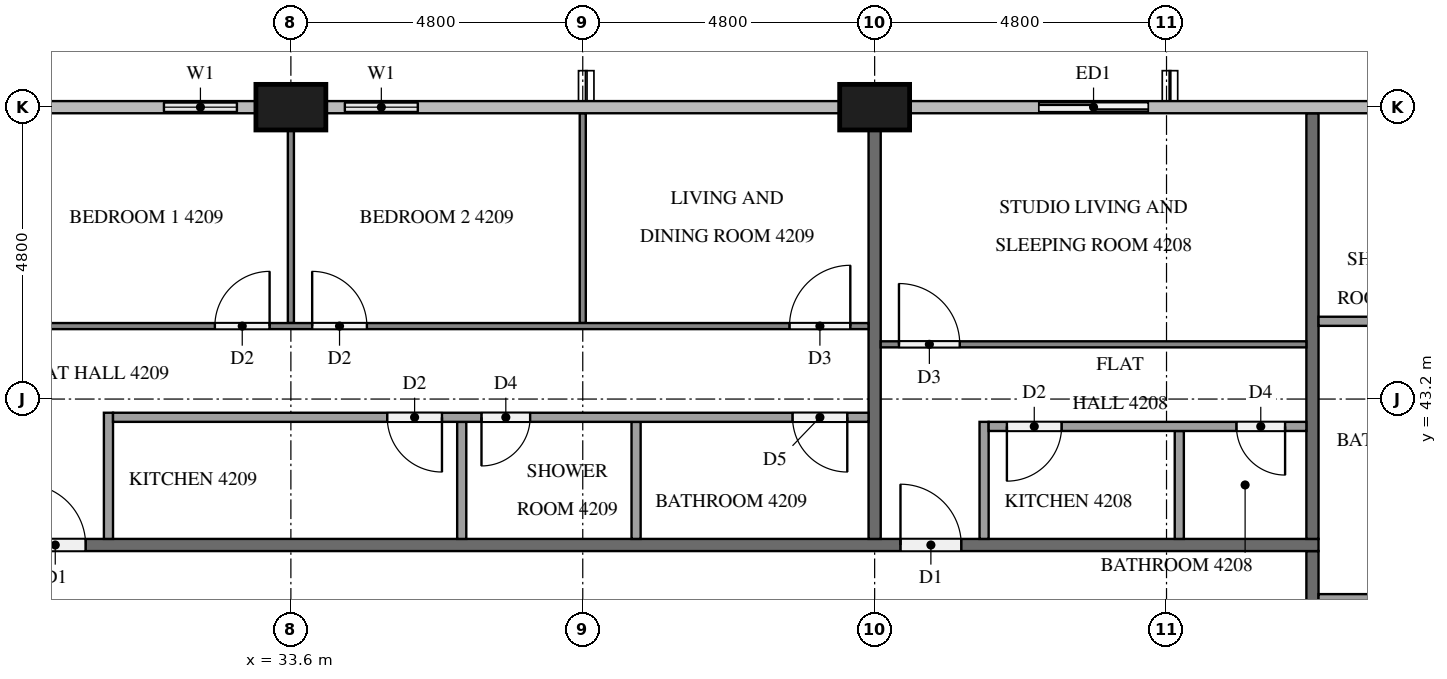
"""IFC4 building model, lengths in metres.
Left out: names, types, materials, properties, quantities, classifications, styles, units other than length and angle.
Written with IfcOpenShell. Run it as: python <this file> out.ifc"""

import sys

from ifc_helpers import new_model, si_unit, direction, frame, frame_2d, origin, origin_2d, place, context, subcontext, project, spatial, rectangle, extrude, element, fill, save


model = new_model("IFC4")
c1 = context("Model", 3, precision=1e-05, world=origin(), true_north=direction((0.0, 1.0)))
c2 = subcontext(c1, "Body", "Model", "MODEL_VIEW")
j1 = project(units=[si_unit("LENGTHUNIT", "METRE"), si_unit("PLANEANGLEUNIT", "RADIAN")], contexts=[c1])
p1 = place(None, origin())
s1 = spatial("IfcSite", under=j1, at=p1, CompositionType="ELEMENT")
p2 = place(p1, origin())
s2 = spatial("IfcBuilding", under=s1, at=p2, CompositionType="ELEMENT")
p3 = place(p2, frame((0.0, 0.0, 163.0)))
s3 = spatial("IfcBuildingStorey", under=s2, at=p3, CompositionType="ELEMENT", Elevation=163.0)
for number, where, z_axis, x_axis in (
    (1, (43.2, 48.0, 0.0), (0.0, 0.0, 1.0), (1.0, 0.0, 0.0)),
    (2, (33.6, 48.0, 0.0), (0.0, 0.0, 1.0), (1.0, 0.0, 0.0)),
):
    element("IfcColumn", number, at=place(p3, frame(where, z_axis=z_axis, x_axis=x_axis)), inside=s3, PredefinedType="COLUMN", context=c2, shape_type="SweptSolid", body=[
        extrude(rectangle(XDim=1.15, YDim=0.75, at=origin_2d()), origin(), (0.0, 0.0, 1.0), 3.2),
    ])
p4 = place(p3, frame((48.0, 48.0, 0.0), z_axis=(0.0, 0.0, 1.0), x_axis=(-1.0, 0.0, 0.0)))
e3 = element("IfcWall", 3, at=p4, inside=s3, PredefinedType="SOLIDWALL", context=c2, shape_type="SweptSolid", body=[
    extrude(rectangle(XDim=2.4, YDim=0.15, at=frame_2d((1.2, 0.0))), origin(), (0.0, 0.0, 1.0), 3.2),
])
p5 = place(p4, frame((0.3, 0.0, 0.0)))
e4 = element("IfcOpeningElement", 4, at=p5, cuts=e3, PredefinedType="OPENING", context=c2, shape_type="SweptSolid", body=[
    extrude(rectangle(XDim=1.8, YDim=2.4, at=frame_2d((0.9, 1.2))), frame((0.0, 0.085, 0.0), z_axis=(0.0, -1.0, 0.0), x_axis=(1.0, 0.0, 0.0)), (0.0, 0.0, 1.0), 0.17),
])
p6 = place(p3, frame((36.0, 48.0, 0.0), z_axis=(0.0, 0.0, 1.0), x_axis=(-1.0, 0.0, 0.0)))
e5 = element("IfcWall", 5, at=p6, inside=s3, PredefinedType="SOLIDWALL", context=c2, shape_type="SweptSolid", body=[
    extrude(rectangle(XDim=1.825, YDim=0.15, at=frame_2d((0.913, 0.0))), origin(), (0.0, 0.0, 1.0), 3.2),
])
p7 = place(p6, frame((0.312, 0.0, 0.9)))
e6 = element("IfcOpeningElement", 6, at=p7, cuts=e5, PredefinedType="OPENING", context=c2, shape_type="SweptSolid", body=[
    extrude(rectangle(XDim=1.2, YDim=1.4, at=frame_2d((0.6, 0.7))), frame((0.0, 0.085, 0.0), z_axis=(0.0, -1.0, 0.0), x_axis=(1.0, 0.0, 0.0)), (0.0, 0.0, 1.0), 0.17),
])
p8 = place(p3, frame((33.025, 48.0, 0.0), z_axis=(0.0, 0.0, 1.0), x_axis=(-1.0, 0.0, 0.0)))
e7 = element("IfcWall", 7, at=p8, inside=s3, PredefinedType="SOLIDWALL", context=c2, shape_type="SweptSolid", body=[
    extrude(rectangle(XDim=1.825, YDim=0.15, at=frame_2d((0.913, 0.0))), origin(), (0.0, 0.0, 1.0), 3.2),
])
p9 = place(p8, frame((0.312, 0.0, 0.9)))
e8 = element("IfcOpeningElement", 8, at=p9, cuts=e7, PredefinedType="OPENING", context=c2, shape_type="SweptSolid", body=[
    extrude(rectangle(XDim=1.2, YDim=1.4, at=frame_2d((0.6, 0.7))), frame((0.0, 0.085, 0.0), z_axis=(0.0, -1.0, 0.0), x_axis=(1.0, 0.0, 0.0)), (0.0, 0.0, 1.0), 0.17),
])
p10 = place(p3, frame((50.4, 40.7, 0.0), z_axis=(0.0, 0.0, 1.0), x_axis=(0.0, -1.0, 0.0)))
e9 = element("IfcWall", 9, at=p10, inside=s3, PredefinedType="PARTITIONING", context=c2, shape_type="SweptSolid", body=[
    extrude(rectangle(XDim=28.6, YDim=0.2, at=frame_2d((14.3, 0.0))), origin(), (0.0, 0.0, 1.0), 3.2),
])
p11 = place(p10, frame((19.525, 0.0, 0.0)))
e10 = element("IfcOpeningElement", 10, at=p11, cuts=e9, PredefinedType="OPENING", context=c2, shape_type="SweptSolid", body=[
    extrude(rectangle(XDim=1.0, YDim=2.1, at=frame_2d((0.5, 1.05))), frame((0.0, 0.11, 0.0), z_axis=(0.0, -1.0, 0.0), x_axis=(1.0, 0.0, 0.0)), (0.0, 0.0, 1.0), 0.22),
])
p12 = place(p10, frame((17.675, 0.0, 0.0)))
e11 = element("IfcOpeningElement", 11, at=p12, cuts=e9, PredefinedType="OPENING", context=c2, shape_type="SweptSolid", body=[
    extrude(rectangle(XDim=1.0, YDim=2.1, at=frame_2d((0.5, 1.05))), frame((0.0, 0.11, 0.0), z_axis=(0.0, -1.0, 0.0), x_axis=(1.0, 0.0, 0.0)), (0.0, 0.0, 1.0), 0.22),
])
p13 = place(p10, frame((8.075, 0.0, 0.0)))
e12 = element("IfcOpeningElement", 12, at=p13, cuts=e9, PredefinedType="OPENING", context=c2, shape_type="SweptSolid", body=[
    extrude(rectangle(XDim=1.0, YDim=2.1, at=frame_2d((0.5, 1.05))), frame((0.0, 0.11, 0.0), z_axis=(0.0, -1.0, 0.0), x_axis=(1.0, 0.0, 0.0)), (0.0, 0.0, 1.0), 0.22),
])
p14 = place(p3, frame((11.9, 40.8, 0.0), z_axis=(0.0, 0.0, 1.0), x_axis=(1.0, 0.0, 0.0)))
e13 = element("IfcWall", 13, at=p14, inside=s3, PredefinedType="PARTITIONING", context=c2, shape_type="SweptSolid", body=[
    extrude(rectangle(XDim=38.6, YDim=0.2, at=frame_2d((19.3, 0.0))), origin(), (0.0, 0.0, 1.0), 3.2),
])
p15 = place(p14, frame((31.725, 0.0, 0.0)))
e14 = element("IfcOpeningElement", 14, at=p15, cuts=e13, PredefinedType="OPENING", context=c2, shape_type="SweptSolid", body=[
    extrude(rectangle(XDim=1.0, YDim=2.1, at=frame_2d((0.5, 1.05))), frame((0.0, 0.11, 0.0), z_axis=(0.0, -1.0, 0.0), x_axis=(1.0, 0.0, 0.0)), (0.0, 0.0, 1.0), 0.22),
])
p16 = place(p14, frame((17.325, 0.0, 0.0)))
e15 = element("IfcOpeningElement", 15, at=p16, cuts=e13, PredefinedType="OPENING", context=c2, shape_type="SweptSolid", body=[
    extrude(rectangle(XDim=1.0, YDim=2.1, at=frame_2d((0.5, 1.05))), frame((0.0, 0.11, 0.0), z_axis=(0.0, -1.0, 0.0), x_axis=(1.0, 0.0, 0.0)), (0.0, 0.0, 1.0), 0.22),
])
p17 = place(p14, frame((0.525, 0.0, 0.0)))
e16 = element("IfcOpeningElement", 16, at=p17, cuts=e13, PredefinedType="OPENING", context=c2, shape_type="SweptSolid", body=[
    extrude(rectangle(XDim=1.0, YDim=2.1, at=frame_2d((0.5, 1.05))), frame((0.0, 0.11, 0.0), z_axis=(0.0, -1.0, 0.0), x_axis=(1.0, 0.0, 0.0)), (0.0, 0.0, 1.0), 0.22),
])
p18 = place(p3, frame((50.4, 40.9, 0.0), z_axis=(0.0, 0.0, 1.0), x_axis=(0.0, 1.0, 0.0)))
e17 = element("IfcWall", 17, at=p18, inside=s3, PredefinedType="PARTITIONING", context=c2, shape_type="SweptSolid", body=[
    extrude(rectangle(XDim=7.0, YDim=0.2, at=frame_2d((3.5, 0.0))), origin(), (0.0, 0.0, 1.0), 3.2),
])
p19 = place(p3, frame((43.2, 47.625, 0.0), z_axis=(0.0, 0.0, 1.0), x_axis=(0.0, -1.0, 0.0)))
e18 = element("IfcWall", 18, at=p19, inside=s3, PredefinedType="PARTITIONING", context=c2, shape_type="SweptSolid", body=[
    extrude(rectangle(XDim=6.725, YDim=0.2, at=frame_2d((3.363, 0.0))), origin(), (0.0, 0.0, 1.0), 3.2),
])
for number, where, z_axis, x_axis in (
    (19, (50.5, 39.917, 0.0), (0.0, 0.0, 1.0), (1.0, 0.0, 0.0)),
    (20, (50.5, 44.479, 0.0), (0.0, 0.0, 1.0), (1.0, 0.0, 0.0)),
):
    element("IfcWall", number, at=place(p3, frame(where, z_axis=z_axis, x_axis=x_axis)), inside=s3, PredefinedType="PARTITIONING", context=c2, shape_type="SweptSolid", body=[
        extrude(rectangle(XDim=2.375, YDim=0.15, at=frame_2d((1.188, 0.0))), origin(), (0.0, 0.0, 1.0), 3.2),
    ])
p20 = place(p3, frame((43.3, 44.1, 0.0), z_axis=(0.0, 0.0, 1.0), x_axis=(1.0, 0.0, 0.0)))
e21 = element("IfcWall", 21, at=p20, inside=s3, PredefinedType="PARTITIONING", context=c2, shape_type="SweptSolid", body=[
    extrude(rectangle(XDim=7.0, YDim=0.1, at=frame_2d((3.5, 0.0))), origin(), (0.0, 0.0, 1.0), 3.2),
])
p21 = place(p20, frame((0.3, 0.0, 0.0)))
e22 = element("IfcOpeningElement", 22, at=p21, cuts=e21, PredefinedType="OPENING", context=c2, shape_type="SweptSolid", body=[
    extrude(rectangle(XDim=1.0, YDim=2.1, at=frame_2d((0.5, 1.05))), frame((0.0, 0.06, 0.0), z_axis=(0.0, -1.0, 0.0), x_axis=(1.0, 0.0, 0.0)), (0.0, 0.0, 1.0), 0.12),
])
p22 = place(p3, frame((48.21, 40.9, 0.0), z_axis=(0.0, 0.0, 1.0), x_axis=(0.0, 1.0, 0.0)))
e23 = element("IfcWall", 23, at=p22, inside=s3, PredefinedType="PARTITIONING", context=c2, shape_type="SweptSolid", body=[
    extrude(rectangle(XDim=1.775, YDim=0.15, at=frame_2d((0.888, 0.0))), origin(), (0.0, 0.0, 1.0), 3.2),
])
p23 = place(p3, frame((45.0, 40.9, 0.0), z_axis=(0.0, 0.0, 1.0), x_axis=(0.0, 1.0, 0.0)))
e24 = element("IfcWall", 24, at=p23, inside=s3, PredefinedType="PARTITIONING", context=c2, shape_type="SweptSolid", body=[
    extrude(rectangle(XDim=1.925, YDim=0.15, at=frame_2d((0.962, 0.0))), origin(), (0.0, 0.0, 1.0), 3.2),
])
p24 = place(p3, frame((50.3, 42.75, 0.0), z_axis=(0.0, 0.0, 1.0), x_axis=(-1.0, 0.0, 0.0)))
e25 = element("IfcWall", 25, at=p24, inside=s3, PredefinedType="PARTITIONING", context=c2, shape_type="SweptSolid", body=[
    extrude(rectangle(XDim=5.225, YDim=0.15, at=frame_2d((2.613, 0.0))), origin(), (0.0, 0.0, 1.0), 3.2),
])
p25 = place(p24, frame((4.025, 0.0, 0.0)))
e26 = element("IfcOpeningElement", 26, at=p25, cuts=e25, PredefinedType="OPENING", context=c2, shape_type="SweptSolid", body=[
    extrude(rectangle(XDim=0.9, YDim=2.1, at=frame_2d((0.45, 1.05))), frame((0.0, 0.085, 0.0), z_axis=(0.0, -1.0, 0.0), x_axis=(1.0, 0.0, 0.0)), (0.0, 0.0, 1.0), 0.17),
])
p26 = place(p24, frame((0.35, 0.0, 0.0)))
e27 = element("IfcOpeningElement", 27, at=p26, cuts=e25, PredefinedType="OPENING", context=c2, shape_type="SweptSolid", body=[
    extrude(rectangle(XDim=0.8, YDim=2.1, at=frame_2d((0.4, 1.05))), frame((0.0, 0.085, 0.0), z_axis=(0.0, -1.0, 0.0), x_axis=(1.0, 0.0, 0.0)), (0.0, 0.0, 1.0), 0.17),
])
p27 = place(p3, frame((33.6, 44.45, 0.0), z_axis=(0.0, 0.0, 1.0), x_axis=(0.0, 1.0, 0.0)))
e28 = element("IfcWall", 28, at=p27, inside=s3, PredefinedType="PARTITIONING", context=c2, shape_type="SweptSolid", body=[
    extrude(rectangle(XDim=3.175, YDim=0.1, at=frame_2d((1.587, 0.0))), origin(), (0.0, 0.0, 1.0), 3.2),
])
p28 = place(p3, frame((38.4, 44.45, 0.0), z_axis=(0.0, 0.0, 1.0), x_axis=(0.0, 1.0, 0.0)))
e29 = element("IfcWall", 29, at=p28, inside=s3, PredefinedType="PARTITIONING", context=c2, shape_type="SweptSolid", body=[
    extrude(rectangle(XDim=3.45, YDim=0.1, at=frame_2d((1.725, 0.0))), origin(), (0.0, 0.0, 1.0), 3.2),
])
p29 = place(p3, frame((28.9, 44.4, 0.0), z_axis=(0.0, 0.0, 1.0), x_axis=(1.0, 0.0, 0.0)))
e30 = element("IfcWall", 30, at=p29, inside=s3, PredefinedType="PARTITIONING", context=c2, shape_type="SweptSolid", body=[
    extrude(rectangle(XDim=14.2, YDim=0.1, at=frame_2d((7.1, 0.0))), origin(), (0.0, 0.0, 1.0), 3.2),
])
p30 = place(p29, frame((3.45, 0.0, 0.0)))
e31 = element("IfcOpeningElement", 31, at=p30, cuts=e30, PredefinedType="OPENING", context=c2, shape_type="SweptSolid", body=[
    extrude(rectangle(XDim=0.9, YDim=2.1, at=frame_2d((0.45, 1.05))), frame((0.0, 0.06, 0.0), z_axis=(0.0, -1.0, 0.0), x_axis=(1.0, 0.0, 0.0)), (0.0, 0.0, 1.0), 0.12),
])
p31 = place(p29, frame((5.05, 0.0, 0.0)))
e32 = element("IfcOpeningElement", 32, at=p31, cuts=e30, PredefinedType="OPENING", context=c2, shape_type="SweptSolid", body=[
    extrude(rectangle(XDim=0.9, YDim=2.1, at=frame_2d((0.45, 1.05))), frame((0.0, 0.06, 0.0), z_axis=(0.0, -1.0, 0.0), x_axis=(1.0, 0.0, 0.0)), (0.0, 0.0, 1.0), 0.12),
])
p32 = place(p29, frame((12.9, 0.0, 0.0)))
e33 = element("IfcOpeningElement", 33, at=p32, cuts=e30, PredefinedType="OPENING", context=c2, shape_type="SweptSolid", body=[
    extrude(rectangle(XDim=1.0, YDim=2.1, at=frame_2d((0.5, 1.05))), frame((0.0, 0.06, 0.0), z_axis=(0.0, -1.0, 0.0), x_axis=(1.0, 0.0, 0.0)), (0.0, 0.0, 1.0), 0.12),
])
for number, where, z_axis, x_axis in (
    (34, (36.41, 40.9, 0.0), (0.0, 0.0, 1.0), (0.0, 1.0, 0.0)),
    (35, (39.277, 40.9, 0.0), (0.0, 0.0, 1.0), (0.0, 1.0, 0.0)),
):
    element("IfcWall", number, at=place(p3, frame(where, z_axis=z_axis, x_axis=x_axis)), inside=s3, PredefinedType="PARTITIONING", context=c2, shape_type="SweptSolid", body=[
        extrude(rectangle(XDim=1.925, YDim=0.15, at=frame_2d((0.962, 0.0))), origin(), (0.0, 0.0, 1.0), 3.2),
    ])
p33 = place(p3, frame((30.6, 40.9, 0.0), z_axis=(0.0, 0.0, 1.0), x_axis=(0.0, 1.0, 0.0)))
e36 = element("IfcWall", 36, at=p33, inside=s3, PredefinedType="PARTITIONING", context=c2, shape_type="SweptSolid", body=[
    extrude(rectangle(XDim=2.075, YDim=0.15, at=frame_2d((1.038, 0.0))), origin(), (0.0, 0.0, 1.0), 3.2),
])
p34 = place(p3, frame((43.1, 42.9, 0.0), z_axis=(0.0, 0.0, 1.0), x_axis=(-1.0, 0.0, 0.0)))
e37 = element("IfcWall", 37, at=p34, inside=s3, PredefinedType="PARTITIONING", context=c2, shape_type="SweptSolid", body=[
    extrude(rectangle(XDim=12.425, YDim=0.15, at=frame_2d((6.212, 0.0))), origin(), (0.0, 0.0, 1.0), 3.2),
])
p35 = place(p34, frame((7.015, 0.0, 0.0)))
e38 = element("IfcOpeningElement", 38, at=p35, cuts=e37, PredefinedType="OPENING", context=c2, shape_type="SweptSolid", body=[
    extrude(rectangle(XDim=0.9, YDim=2.1, at=frame_2d((0.45, 1.05))), frame((0.0, 0.085, 0.0), z_axis=(0.0, -1.0, 0.0), x_axis=(1.0, 0.0, 0.0)), (0.0, 0.0, 1.0), 0.17),
])
p36 = place(p34, frame((5.565, 0.0, 0.0)))
e39 = element("IfcOpeningElement", 39, at=p36, cuts=e37, PredefinedType="OPENING", context=c2, shape_type="SweptSolid", body=[
    extrude(rectangle(XDim=0.8, YDim=2.1, at=frame_2d((0.4, 1.05))), frame((0.0, 0.085, 0.0), z_axis=(0.0, -1.0, 0.0), x_axis=(1.0, 0.0, 0.0)), (0.0, 0.0, 1.0), 0.17),
])
p37 = place(p34, frame((0.35, 0.0, 0.0)))
e40 = element("IfcOpeningElement", 40, at=p37, cuts=e37, PredefinedType="OPENING", context=c2, shape_type="SweptSolid", body=[
    extrude(rectangle(XDim=0.9, YDim=2.1, at=frame_2d((0.45, 1.05))), frame((0.0, 0.085, 0.0), z_axis=(0.0, -1.0, 0.0), x_axis=(1.0, 0.0, 0.0)), (0.0, 0.0, 1.0), 0.17),
])
p38 = place(p5, origin())
e41 = element("IfcDoor", 41, at=p38, inside=s3, OperationType="SLIDING_TO_LEFT", PredefinedType="DOOR", context=c2, shape_type="SweptSolid", body=[
    extrude(rectangle(XDim=1.8, YDim=2.4, at=frame_2d((0.9, 1.2))), frame((0.0, 0.025, 0.0), z_axis=(0.0, -1.0, 0.0), x_axis=(1.0, 0.0, 0.0)), (0.0, 0.0, 1.0), 0.05),
])
fill(e4, e41)
p39 = place(p7, origin())
e42 = element("IfcWindow", 42, at=p39, inside=s3, PartitioningType="SINGLE_PANEL", PredefinedType="WINDOW", context=c2, shape_type="SweptSolid", body=[
    extrude(rectangle(XDim=1.2, YDim=1.4, at=frame_2d((0.6, 0.7))), frame((0.0, 0.03, 0.0), z_axis=(0.0, -1.0, 0.0), x_axis=(1.0, 0.0, 0.0)), (0.0, 0.0, 1.0), 0.06),
])
fill(e6, e42)
p40 = place(p9, origin())
e43 = element("IfcWindow", 43, at=p40, inside=s3, PartitioningType="SINGLE_PANEL", PredefinedType="WINDOW", context=c2, shape_type="SweptSolid", body=[
    extrude(rectangle(XDim=1.2, YDim=1.4, at=frame_2d((0.6, 0.7))), frame((0.0, 0.03, 0.0), z_axis=(0.0, -1.0, 0.0), x_axis=(1.0, 0.0, 0.0)), (0.0, 0.0, 1.0), 0.06),
])
fill(e8, e43)
p41 = place(p15, origin())
e44 = element("IfcDoor", 44, at=p41, inside=s3, OperationType="SINGLE_SWING_LEFT", PredefinedType="DOOR", context=c2, shape_type="SweptSolid", body=[
    extrude(rectangle(XDim=1.0, YDim=2.1, at=frame_2d((0.5, 1.05))), frame((0.0, 0.025, 0.0), z_axis=(0.0, -1.0, 0.0), x_axis=(1.0, 0.0, 0.0)), (0.0, 0.0, 1.0), 0.05),
])
fill(e14, e44)
p42 = place(p16, origin())
e45 = element("IfcDoor", 45, at=p42, inside=s3, OperationType="SINGLE_SWING_LEFT", PredefinedType="DOOR", context=c2, shape_type="SweptSolid", body=[
    extrude(rectangle(XDim=1.0, YDim=2.1, at=frame_2d((0.5, 1.05))), frame((0.0, 0.025, 0.0), z_axis=(0.0, -1.0, 0.0), x_axis=(1.0, 0.0, 0.0)), (0.0, 0.0, 1.0), 0.05),
])
fill(e15, e45)
p43 = place(p21, origin())
e46 = element("IfcDoor", 46, at=p43, inside=s3, OperationType="SINGLE_SWING_LEFT", PredefinedType="DOOR", context=c2, shape_type="SweptSolid", body=[
    extrude(rectangle(XDim=1.0, YDim=2.1, at=frame_2d((0.5, 1.05))), frame((0.0, 0.025, 0.0), z_axis=(0.0, -1.0, 0.0), x_axis=(1.0, 0.0, 0.0)), (0.0, 0.0, 1.0), 0.05),
])
fill(e22, e46)
p44 = place(p25, origin())
e47 = element("IfcDoor", 47, at=p44, inside=s3, OperationType="SINGLE_SWING_RIGHT", PredefinedType="DOOR", context=c2, shape_type="SweptSolid", body=[
    extrude(rectangle(XDim=0.9, YDim=2.1, at=frame_2d((0.45, 1.05))), frame((0.0, 0.025, 0.0), z_axis=(0.0, -1.0, 0.0), x_axis=(1.0, 0.0, 0.0)), (0.0, 0.0, 1.0), 0.05),
])
fill(e26, e47)
p45 = place(p26, origin())
e48 = element("IfcDoor", 48, at=p45, inside=s3, OperationType="SINGLE_SWING_LEFT", PredefinedType="DOOR", context=c2, shape_type="SweptSolid", body=[
    extrude(rectangle(XDim=0.8, YDim=2.1, at=frame_2d((0.4, 1.05))), frame((0.0, 0.025, 0.0), z_axis=(0.0, -1.0, 0.0), x_axis=(1.0, 0.0, 0.0)), (0.0, 0.0, 1.0), 0.05),
])
fill(e27, e48)
p46 = place(p30, origin())
e49 = element("IfcDoor", 49, at=p46, inside=s3, OperationType="SINGLE_SWING_RIGHT", PredefinedType="DOOR", context=c2, shape_type="SweptSolid", body=[
    extrude(rectangle(XDim=0.9, YDim=2.1, at=frame_2d((0.45, 1.05))), frame((0.0, 0.025, 0.0), z_axis=(0.0, -1.0, 0.0), x_axis=(1.0, 0.0, 0.0)), (0.0, 0.0, 1.0), 0.05),
])
fill(e31, e49)
p47 = place(p31, origin())
e50 = element("IfcDoor", 50, at=p47, inside=s3, OperationType="SINGLE_SWING_LEFT", PredefinedType="DOOR", context=c2, shape_type="SweptSolid", body=[
    extrude(rectangle(XDim=0.9, YDim=2.1, at=frame_2d((0.45, 1.05))), frame((0.0, 0.025, 0.0), z_axis=(0.0, -1.0, 0.0), x_axis=(1.0, 0.0, 0.0)), (0.0, 0.0, 1.0), 0.05),
])
fill(e32, e50)
p48 = place(p32, origin())
e51 = element("IfcDoor", 51, at=p48, inside=s3, OperationType="SINGLE_SWING_RIGHT", PredefinedType="DOOR", context=c2, shape_type="SweptSolid", body=[
    extrude(rectangle(XDim=1.0, YDim=2.1, at=frame_2d((0.5, 1.05))), frame((0.0, 0.025, 0.0), z_axis=(0.0, -1.0, 0.0), x_axis=(1.0, 0.0, 0.0)), (0.0, 0.0, 1.0), 0.05),
])
fill(e33, e51)
p49 = place(p35, origin())
e52 = element("IfcDoor", 52, at=p49, inside=s3, OperationType="SINGLE_SWING_LEFT", PredefinedType="DOOR", context=c2, shape_type="SweptSolid", body=[
    extrude(rectangle(XDim=0.9, YDim=2.1, at=frame_2d((0.45, 1.05))), frame((0.0, 0.025, 0.0), z_axis=(0.0, -1.0, 0.0), x_axis=(1.0, 0.0, 0.0)), (0.0, 0.0, 1.0), 0.05),
])
fill(e38, e52)
p50 = place(p36, origin())
e53 = element("IfcDoor", 53, at=p50, inside=s3, OperationType="SINGLE_SWING_RIGHT", PredefinedType="DOOR", context=c2, shape_type="SweptSolid", body=[
    extrude(rectangle(XDim=0.8, YDim=2.1, at=frame_2d((0.4, 1.05))), frame((0.0, 0.025, 0.0), z_axis=(0.0, -1.0, 0.0), x_axis=(1.0, 0.0, 0.0)), (0.0, 0.0, 1.0), 0.05),
])
fill(e39, e53)
p51 = place(p37, origin())
e54 = element("IfcDoor", 54, at=p51, inside=s3, OperationType="SINGLE_SWING_LEFT", PredefinedType="DOOR", context=c2, shape_type="SweptSolid", body=[
    extrude(rectangle(XDim=0.9, YDim=2.1, at=frame_2d((0.45, 1.05))), frame((0.0, 0.025, 0.0), z_axis=(0.0, -1.0, 0.0), x_axis=(1.0, 0.0, 0.0)), (0.0, 0.0, 1.0), 0.05),
])
fill(e40, e54)
save(model, sys.argv[1])
